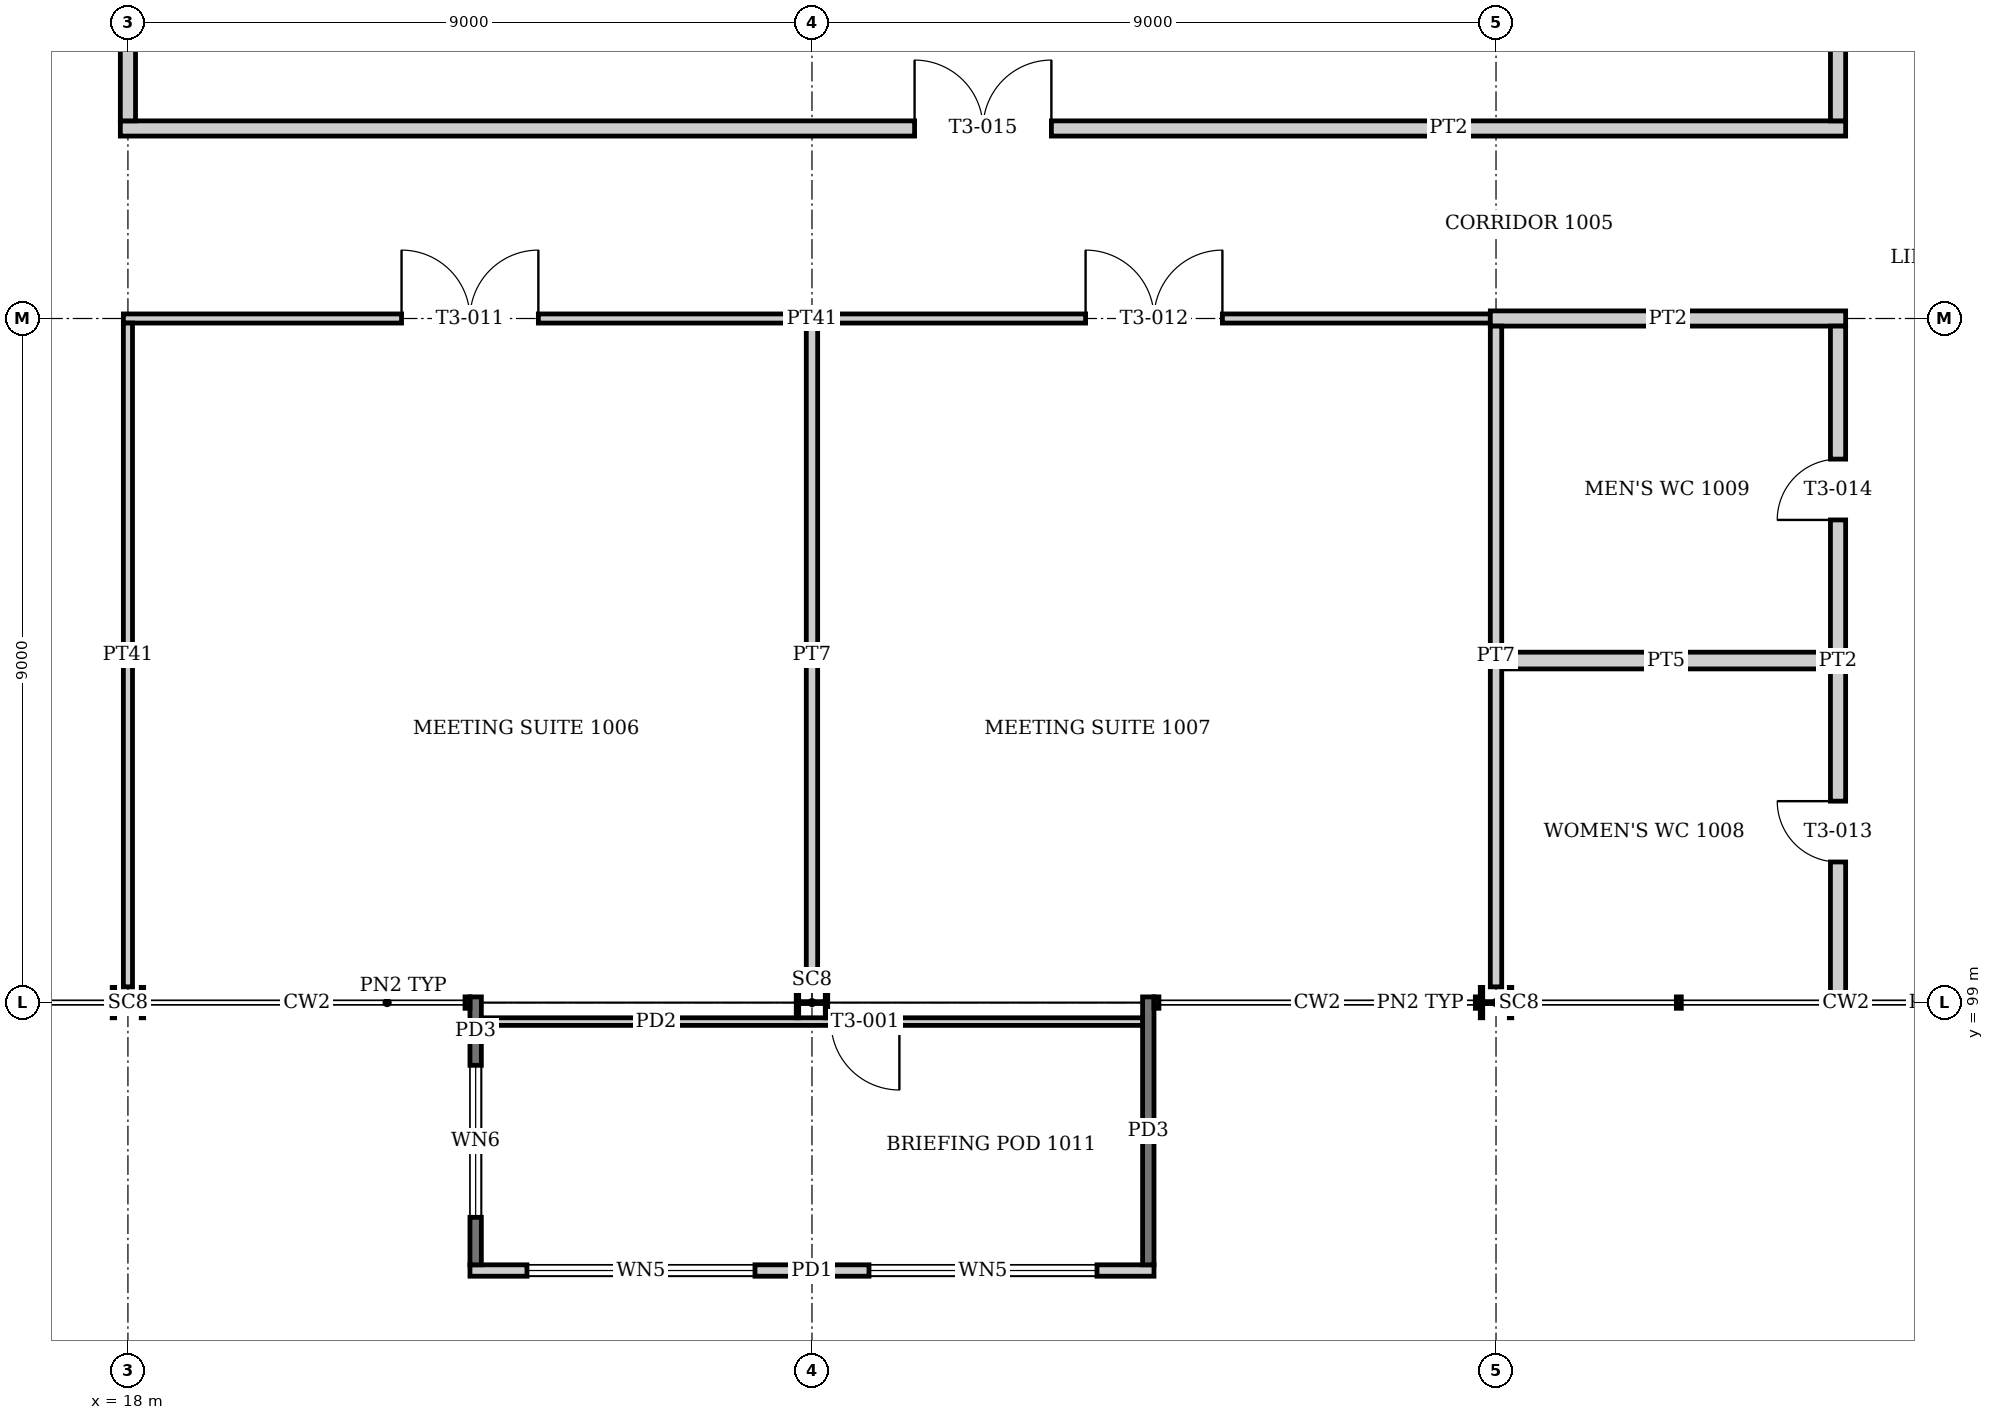
"""IFC4 building model, lengths in metres.
Left out: names, types, materials, properties, quantities, classifications, styles, units other than length and angle.
Written with IfcOpenShell. Run it as: python <this file> out.ifc"""

import sys

from ifc_helpers import new_model, si_unit, direction, frame, frame_2d, origin, origin_2d, place, context, subcontext, project, spatial, rectangle, i_section, extrude, element, fill, save


model = new_model("IFC4")
c1 = context("Model", 3, precision=1e-05, world=origin(), true_north=direction((0.0, 1.0)))
c2 = subcontext(c1, "Body", "Model", "MODEL_VIEW")
j1 = project(units=[si_unit("LENGTHUNIT", "METRE"), si_unit("PLANEANGLEUNIT", "RADIAN")], contexts=[c1])
p1 = place(None, origin())
s1 = spatial("IfcSite", under=j1, at=p1, CompositionType="ELEMENT")
p2 = place(p1, origin())
s2 = spatial("IfcBuilding", under=s1, at=p2, CompositionType="ELEMENT")
p3 = place(p2, frame((0.0, 0.0, 43.2)))
s3 = spatial("IfcBuildingStorey", under=s2, at=p3, CompositionType="ELEMENT", Elevation=43.2)
for number, where, z_axis, x_axis in (
    (1, (18.0, 99.0, 0.0), (0.0, 0.0, 1.0), (0.0, 1.0, 0.0)),
    (2, (27.0, 99.0, 0.0), (0.0, 0.0, 1.0), (0.0, 1.0, 0.0)),
    (3, (36.0, 99.0, 0.0), (0.0, 0.0, 1.0), (0.0, 1.0, 0.0)),
):
    element("IfcColumn", number, at=place(p3, frame(where, z_axis=z_axis, x_axis=x_axis)), inside=s3, PredefinedType="COLUMN", context=c2, shape_type="SweptSolid", body=[
        extrude(i_section(OverallWidth=0.4, OverallDepth=0.414, WebThickness=0.025, FlangeThickness=0.032, at=origin_2d()), origin(), (0.0, 0.0, 1.0), 4.0),
    ])
p4 = place(p3, frame((22.5, 95.475, 0.0), z_axis=(0.0, 0.0, 1.0), x_axis=(1.0, 0.0, 0.0)))
e4 = element("IfcWall", 4, at=p4, inside=s3, PredefinedType="SOLIDWALL", context=c2, shape_type="SweptSolid", body=[
    extrude(rectangle(XDim=9.0, YDim=0.15, at=frame_2d((4.5, 0.0))), origin(), (0.0, 0.0, 1.0), 2.6),
])
p5 = place(p4, frame((0.75, 0.0, 0.9)))
e5 = element("IfcOpeningElement", 5, at=p5, cuts=e4, PredefinedType="OPENING", context=c2, shape_type="SweptSolid", body=[
    extrude(rectangle(XDim=3.0, YDim=1.4, at=frame_2d((1.5, 0.7))), frame((0.0, 0.085, 0.0), z_axis=(0.0, -1.0, 0.0), x_axis=(1.0, 0.0, 0.0)), (0.0, 0.0, 1.0), 0.17),
])
p6 = place(p4, frame((5.25, 0.0, 0.9)))
e6 = element("IfcOpeningElement", 6, at=p6, cuts=e4, PredefinedType="OPENING", context=c2, shape_type="SweptSolid", body=[
    extrude(rectangle(XDim=3.0, YDim=1.4, at=frame_2d((1.5, 0.7))), frame((0.0, 0.085, 0.0), z_axis=(0.0, -1.0, 0.0), x_axis=(1.0, 0.0, 0.0)), (0.0, 0.0, 1.0), 0.17),
])
p7 = place(p3, frame((22.575, 95.55, -0.15), z_axis=(0.0, 0.0, 1.0), x_axis=(0.0, 1.0, 0.0)))
e7 = element("IfcWall", 7, at=p7, inside=s3, PredefinedType="SOLIDWALL", context=c2, shape_type="SweptSolid", body=[
    extrude(rectangle(XDim=3.525, YDim=0.15, at=frame_2d((1.762, 0.0))), origin(), (0.0, 0.0, 1.0), 2.75),
])
p8 = place(p7, frame((0.625, 0.0, 1.05)))
e8 = element("IfcOpeningElement", 8, at=p8, cuts=e7, PredefinedType="OPENING", context=c2, shape_type="SweptSolid", body=[
    extrude(rectangle(XDim=2.0, YDim=1.4, at=frame_2d((1.0, 0.7))), frame((0.0, 0.085, 0.0), z_axis=(0.0, -1.0, 0.0), x_axis=(1.0, 0.0, 0.0)), (0.0, 0.0, 1.0), 0.17),
])
p9 = place(p3, frame((31.425, 95.55, -0.15), z_axis=(0.0, 0.0, 1.0), x_axis=(0.0, 1.0, 0.0)))
e9 = element("IfcWall", 9, at=p9, inside=s3, PredefinedType="SOLIDWALL", context=c2, shape_type="SweptSolid", body=[
    extrude(rectangle(XDim=3.525, YDim=0.15, at=frame_2d((1.762, 0.0))), origin(), (0.0, 0.0, 1.0), 2.75),
])
p10 = place(p3, frame((22.65, 98.75, 0.0), z_axis=(0.0, 0.0, 1.0), x_axis=(1.0, 0.0, 0.0)))
e10 = element("IfcWall", 10, at=p10, inside=s3, PredefinedType="PARTITIONING", context=c2, shape_type="SweptSolid", body=[
    extrude(rectangle(XDim=8.7, YDim=0.1, at=frame_2d((4.35, 0.0))), origin(), (0.0, 0.0, 1.0), 2.6),
])
p11 = place(p10, frame((4.6, 0.0, 0.0)))
e11 = element("IfcOpeningElement", 11, at=p11, cuts=e10, PredefinedType="OPENING", context=c2, shape_type="SweptSolid", body=[
    extrude(rectangle(XDim=0.9, YDim=2.1, at=frame_2d((0.45, 1.05))), frame((0.0, 0.06, 0.0), z_axis=(0.0, -1.0, 0.0), x_axis=(1.0, 0.0, 0.0)), (0.0, 0.0, 1.0), 0.12),
])
p12 = place(p3, frame((36.075, 103.5, 0.0), z_axis=(0.0, 0.0, 1.0), x_axis=(1.0, 0.0, 0.0)))
e12 = element("IfcWall", 12, at=p12, inside=s3, PredefinedType="PLUMBINGWALL", context=c2, shape_type="SweptSolid", body=[
    extrude(rectangle(XDim=4.325, YDim=0.22, at=frame_2d((2.163, 0.0))), origin(), (0.0, 0.0, 1.0), 3.05),
])
p13 = place(p3, frame((17.94, 108.0, 0.0), z_axis=(0.0, 0.0, 1.0), x_axis=(1.0, 0.0, 0.0)))
e13 = element("IfcWall", 13, at=p13, inside=s3, PredefinedType="PARTITIONING", context=c2, shape_type="SweptSolid", body=[
    extrude(rectangle(XDim=17.985, YDim=0.12, at=frame_2d((8.993, 0.0))), origin(), (0.0, 0.0, 1.0), 3.05),
])
p14 = place(p13, frame((3.66, 0.0, 0.0)))
e14 = element("IfcOpeningElement", 14, at=p14, cuts=e13, PredefinedType="OPENING", context=c2, shape_type="SweptSolid", body=[
    extrude(rectangle(XDim=1.8, YDim=2.1, at=frame_2d((0.9, 1.05))), frame((0.0, 0.07, 0.0), z_axis=(0.0, -1.0, 0.0), x_axis=(1.0, 0.0, 0.0)), (0.0, 0.0, 1.0), 0.14),
])
p15 = place(p13, frame((12.66, 0.0, 0.0)))
e15 = element("IfcOpeningElement", 15, at=p15, cuts=e13, PredefinedType="OPENING", context=c2, shape_type="SweptSolid", body=[
    extrude(rectangle(XDim=1.8, YDim=2.1, at=frame_2d((0.9, 1.05))), frame((0.0, 0.07, 0.0), z_axis=(0.0, -1.0, 0.0), x_axis=(1.0, 0.0, 0.0)), (0.0, 0.0, 1.0), 0.14),
])
p16 = place(p3, frame((35.925, 108.0, 0.0), z_axis=(0.0, 0.0, 1.0), x_axis=(1.0, 0.0, 0.0)))
e16 = element("IfcWall", 16, at=p16, inside=s3, PredefinedType="PARTITIONING", context=c2, shape_type="SweptSolid", body=[
    extrude(rectangle(XDim=4.675, YDim=0.2, at=frame_2d((2.337, 0.0))), origin(), (0.0, 0.0, 1.0), 3.05),
])
p17 = place(p3, frame((17.9, 110.5, 0.0), z_axis=(0.0, 0.0, 1.0), x_axis=(1.0, 0.0, 0.0)))
e17 = element("IfcWall", 17, at=p17, inside=s3, PredefinedType="PARTITIONING", context=c2, shape_type="SweptSolid", body=[
    extrude(rectangle(XDim=22.7, YDim=0.2, at=frame_2d((11.35, 0.0))), origin(), (0.0, 0.0, 1.0), 3.05),
])
p18 = place(p17, frame((10.45, 0.0, 0.0)))
e18 = element("IfcOpeningElement", 18, at=p18, cuts=e17, PredefinedType="OPENING", context=c2, shape_type="SweptSolid", body=[
    extrude(rectangle(XDim=1.8, YDim=2.1, at=frame_2d((0.9, 1.05))), frame((0.0, 0.11, 0.0), z_axis=(0.0, -1.0, 0.0), x_axis=(1.0, 0.0, 0.0)), (0.0, 0.0, 1.0), 0.22),
])
p19 = place(p3, frame((18.0, 99.207, 0.0), z_axis=(0.0, 0.0, 1.0), x_axis=(0.0, 1.0, 0.0)))
e19 = element("IfcWall", 19, at=p19, inside=s3, PredefinedType="PARTITIONING", context=c2, shape_type="SweptSolid", body=[
    extrude(rectangle(XDim=8.733, YDim=0.12, at=frame_2d((4.366, 0.0))), origin(), (0.0, 0.0, 1.0), 3.05),
])
p20 = place(p3, frame((18.0, 110.6, 0.0), z_axis=(0.0, 0.0, 1.0), x_axis=(0.0, 1.0, 0.0)))
e20 = element("IfcWall", 20, at=p20, inside=s3, PredefinedType="PARTITIONING", context=c2, shape_type="SweptSolid", body=[
    extrude(rectangle(XDim=6.193, YDim=0.2, at=frame_2d((3.096, 0.0))), origin(), (0.0, 0.0, 1.0), 3.05),
])
p21 = place(p20, frame((3.25, 0.0, 0.0)))
e21 = element("IfcOpeningElement", 21, at=p21, cuts=e20, PredefinedType="OPENING", context=c2, shape_type="SweptSolid", body=[
    extrude(rectangle(XDim=1.8, YDim=2.1, at=frame_2d((0.9, 1.05))), frame((0.0, 0.11, 0.0), z_axis=(0.0, -1.0, 0.0), x_axis=(1.0, 0.0, 0.0)), (0.0, 0.0, 1.0), 0.22),
])
p22 = place(p3, frame((27.0, 99.207, 0.0), z_axis=(0.0, 0.0, 1.0), x_axis=(0.0, 1.0, 0.0)))
e22 = element("IfcWall", 22, at=p22, inside=s3, PredefinedType="PARTITIONING", context=c2, shape_type="SweptSolid", body=[
    extrude(rectangle(XDim=8.733, YDim=0.15, at=frame_2d((4.366, 0.0))), origin(), (0.0, 0.0, 1.0), 3.05),
])
p23 = place(p3, frame((36.0, 99.207, 0.0), z_axis=(0.0, 0.0, 1.0), x_axis=(0.0, 1.0, 0.0)))
e23 = element("IfcWall", 23, at=p23, inside=s3, PredefinedType="PARTITIONING", context=c2, shape_type="SweptSolid", body=[
    extrude(rectangle(XDim=8.693, YDim=0.15, at=frame_2d((4.346, 0.0))), origin(), (0.0, 0.0, 1.0), 3.05),
])
p24 = place(p3, frame((40.5, 99.075, 0.0), z_axis=(0.0, 0.0, 1.0), x_axis=(0.0, 1.0, 0.0)))
e24 = element("IfcWall", 24, at=p24, inside=s3, PredefinedType="PARTITIONING", context=c2, shape_type="SweptSolid", body=[
    extrude(rectangle(XDim=8.825, YDim=0.2, at=frame_2d((4.413, 0.0))), origin(), (0.0, 0.0, 1.0), 3.05),
])
p25 = place(p24, frame((1.775, 0.0, 0.0)))
e25 = element("IfcOpeningElement", 25, at=p25, cuts=e24, PredefinedType="OPENING", context=c2, shape_type="SweptSolid", body=[
    extrude(rectangle(XDim=0.8, YDim=2.1, at=frame_2d((0.4, 1.05))), frame((0.0, 0.11, 0.0), z_axis=(0.0, -1.0, 0.0), x_axis=(1.0, 0.0, 0.0)), (0.0, 0.0, 1.0), 0.22),
])
p26 = place(p24, frame((6.275, 0.0, 0.0)))
e26 = element("IfcOpeningElement", 26, at=p26, cuts=e24, PredefinedType="OPENING", context=c2, shape_type="SweptSolid", body=[
    extrude(rectangle(XDim=0.8, YDim=2.1, at=frame_2d((0.4, 1.05))), frame((0.0, 0.11, 0.0), z_axis=(0.0, -1.0, 0.0), x_axis=(1.0, 0.0, 0.0)), (0.0, 0.0, 1.0), 0.22),
])
p27 = place(p3, frame((40.5, 110.6, 0.0), z_axis=(0.0, 0.0, 1.0), x_axis=(0.0, 1.0, 0.0)))
e27 = element("IfcWall", 27, at=p27, inside=s3, PredefinedType="PARTITIONING", context=c2, shape_type="SweptSolid", body=[
    extrude(rectangle(XDim=6.31, YDim=0.2, at=frame_2d((3.155, 0.0))), origin(), (0.0, 0.0, 1.0), 3.05),
])
p28 = place(p5, origin())
e28 = element("IfcWindow", 28, at=p28, inside=s3, PartitioningType="SINGLE_PANEL", PredefinedType="WINDOW", context=c2, shape_type="SweptSolid", body=[
    extrude(rectangle(XDim=3.0, YDim=1.4, at=frame_2d((1.5, 0.7))), frame((0.0, 0.03, 0.0), z_axis=(0.0, -1.0, 0.0), x_axis=(1.0, 0.0, 0.0)), (0.0, 0.0, 1.0), 0.06),
])
fill(e5, e28)
p29 = place(p6, origin())
e29 = element("IfcWindow", 29, at=p29, inside=s3, PartitioningType="SINGLE_PANEL", PredefinedType="WINDOW", context=c2, shape_type="SweptSolid", body=[
    extrude(rectangle(XDim=3.0, YDim=1.4, at=frame_2d((1.5, 0.7))), frame((0.0, 0.03, 0.0), z_axis=(0.0, -1.0, 0.0), x_axis=(1.0, 0.0, 0.0)), (0.0, 0.0, 1.0), 0.06),
])
fill(e6, e29)
p30 = place(p8, origin())
e30 = element("IfcWindow", 30, at=p30, inside=s3, PartitioningType="SINGLE_PANEL", PredefinedType="WINDOW", context=c2, shape_type="SweptSolid", body=[
    extrude(rectangle(XDim=2.0, YDim=1.4, at=frame_2d((1.0, 0.7))), frame((0.0, 0.03, 0.0), z_axis=(0.0, -1.0, 0.0), x_axis=(1.0, 0.0, 0.0)), (0.0, 0.0, 1.0), 0.06),
])
fill(e8, e30)
p31 = place(p11, frame((0.9, 0.0, 0.0), z_axis=(0.0, 0.0, 1.0), x_axis=(-1.0, 0.0, 0.0)))
e31 = element("IfcDoor", 31, at=p31, inside=s3, OperationType="SINGLE_SWING_LEFT", PredefinedType="DOOR", context=c2, shape_type="SweptSolid", body=[
    extrude(rectangle(XDim=0.9, YDim=2.1, at=frame_2d((0.45, 1.05))), frame((0.0, 0.025, 0.0), z_axis=(0.0, -1.0, 0.0), x_axis=(1.0, 0.0, 0.0)), (0.0, 0.0, 1.0), 0.05),
])
fill(e11, e31)
p32 = place(p14, origin())
e32 = element("IfcDoor", 32, at=p32, inside=s3, OperationType="DOUBLE_DOOR_SINGLE_SWING", PredefinedType="DOOR", context=c2, shape_type="SweptSolid", body=[
    extrude(rectangle(XDim=1.8, YDim=2.1, at=frame_2d((0.9, 1.05))), frame((0.0, 0.025, 0.0), z_axis=(0.0, -1.0, 0.0), x_axis=(1.0, 0.0, 0.0)), (0.0, 0.0, 1.0), 0.05),
])
fill(e14, e32)
p33 = place(p15, origin())
e33 = element("IfcDoor", 33, at=p33, inside=s3, OperationType="DOUBLE_DOOR_SINGLE_SWING", PredefinedType="DOOR", context=c2, shape_type="SweptSolid", body=[
    extrude(rectangle(XDim=1.8, YDim=2.1, at=frame_2d((0.9, 1.05))), frame((0.0, 0.025, 0.0), z_axis=(0.0, -1.0, 0.0), x_axis=(1.0, 0.0, 0.0)), (0.0, 0.0, 1.0), 0.05),
])
fill(e15, e33)
p34 = place(p25, origin())
e34 = element("IfcDoor", 34, at=p34, inside=s3, OperationType="SINGLE_SWING_RIGHT", PredefinedType="DOOR", context=c2, shape_type="SweptSolid", body=[
    extrude(rectangle(XDim=0.8, YDim=2.1, at=frame_2d((0.4, 1.05))), frame((0.0, 0.025, 0.0), z_axis=(0.0, -1.0, 0.0), x_axis=(1.0, 0.0, 0.0)), (0.0, 0.0, 1.0), 0.05),
])
fill(e25, e34)
p35 = place(p26, origin())
e35 = element("IfcDoor", 35, at=p35, inside=s3, OperationType="SINGLE_SWING_LEFT", PredefinedType="DOOR", context=c2, shape_type="SweptSolid", body=[
    extrude(rectangle(XDim=0.8, YDim=2.1, at=frame_2d((0.4, 1.05))), frame((0.0, 0.025, 0.0), z_axis=(0.0, -1.0, 0.0), x_axis=(1.0, 0.0, 0.0)), (0.0, 0.0, 1.0), 0.05),
])
fill(e26, e35)
p36 = place(p18, origin())
e36 = element("IfcDoor", 36, at=p36, inside=s3, OperationType="DOUBLE_DOOR_SINGLE_SWING", PredefinedType="DOOR", context=c2, shape_type="SweptSolid", body=[
    extrude(rectangle(XDim=1.8, YDim=2.1, at=frame_2d((0.9, 1.05))), frame((0.0, 0.025, 0.0), z_axis=(0.0, -1.0, 0.0), x_axis=(1.0, 0.0, 0.0)), (0.0, 0.0, 1.0), 0.05),
])
fill(e18, e36)
save(model, sys.argv[1])
